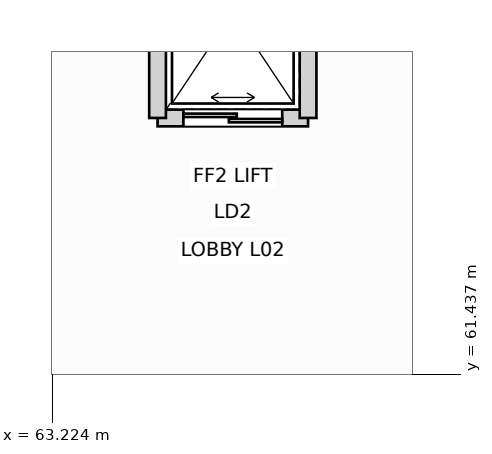
"""IFC4 building model, lengths in metres.
Left out: names, types, materials, properties, quantities, classifications, styles, units other than length and angle.
Written with IfcOpenShell. Run it as: python <this file> out.ifc"""

import sys

from ifc_helpers import new_model, si_unit, direction, frame, frame_2d, origin, place, context, subcontext, project, spatial, rectangle, extrude, element, fill, save


model = new_model("IFC4")
c1 = context("Model", 3, precision=1e-05, world=origin(), true_north=direction((0.0, 1.0)))
c2 = subcontext(c1, "Body", "Model", "MODEL_VIEW")
j1 = project(units=[si_unit("LENGTHUNIT", "METRE"), si_unit("PLANEANGLEUNIT", "RADIAN")], contexts=[c1])
p1 = place(None, origin())
s1 = spatial("IfcSite", under=j1, at=p1, CompositionType="ELEMENT")
p2 = place(p1, origin())
s2 = spatial("IfcBuilding", under=s1, at=p2, CompositionType="ELEMENT")
p3 = place(p2, frame((0.0, 0.0, 11.4)))
s3 = spatial("IfcBuildingStorey", under=s2, at=p3, CompositionType="ELEMENT", Elevation=11.4)
p4 = place(p3, frame((64.61, 64.81, 0.0), z_axis=(0.0, 0.0, 1.0), x_axis=(1.0, 0.0, 0.0)))
e1 = element("IfcWall", 1, at=p4, inside=s3, PredefinedType="PARTITIONING", context=c2, shape_type="SweptSolid", body=[
    extrude(rectangle(XDim=1.98, YDim=0.22, at=frame_2d((0.99, 0.0))), origin(), (0.0, 0.0, 1.0), 5.085),
])
p5 = place(p4, frame((0.34, 0.0, 0.0)))
e2 = element("IfcOpeningElement", 2, at=p5, cuts=e1, PredefinedType="OPENING", context=c2, shape_type="SweptSolid", body=[
    extrude(rectangle(XDim=1.3, YDim=2.2, at=frame_2d((0.65, 1.1))), frame((0.0, 0.12, 0.0), z_axis=(0.0, -1.0, 0.0), x_axis=(1.0, 0.0, 0.0)), (0.0, 0.0, 1.0), 0.24),
])
for number, where, z_axis, x_axis in (
    (3, (64.61, 64.81, 0.0), (0.0, 0.0, 1.0), (0.0, 1.0, 0.0)),
    (4, (66.59, 64.81, 0.0), (0.0, 0.0, 1.0), (0.0, 1.0, 0.0)),
):
    element("IfcWall", number, at=place(p3, frame(where, z_axis=z_axis, x_axis=x_axis)), inside=s3, PredefinedType="PARTITIONING", context=c2, shape_type="SweptSolid", body=[
        extrude(rectangle(XDim=2.78, YDim=0.22, at=frame_2d((1.39, 0.0))), origin(), (0.0, 0.0, 1.0), 4.685),
    ])
p6 = place(p5, origin())
e5 = element("IfcDoor", 5, at=p6, inside=s3, OperationType="DOUBLE_DOOR_SLIDING", PredefinedType="DOOR", context=c2, shape_type="SweptSolid", body=[
    extrude(rectangle(XDim=1.3, YDim=2.2, at=frame_2d((0.65, 1.1))), frame((0.0, 0.025, 0.0), z_axis=(0.0, -1.0, 0.0), x_axis=(1.0, 0.0, 0.0)), (0.0, 0.0, 1.0), 0.05),
])
fill(e2, e5)
save(model, sys.argv[1])
